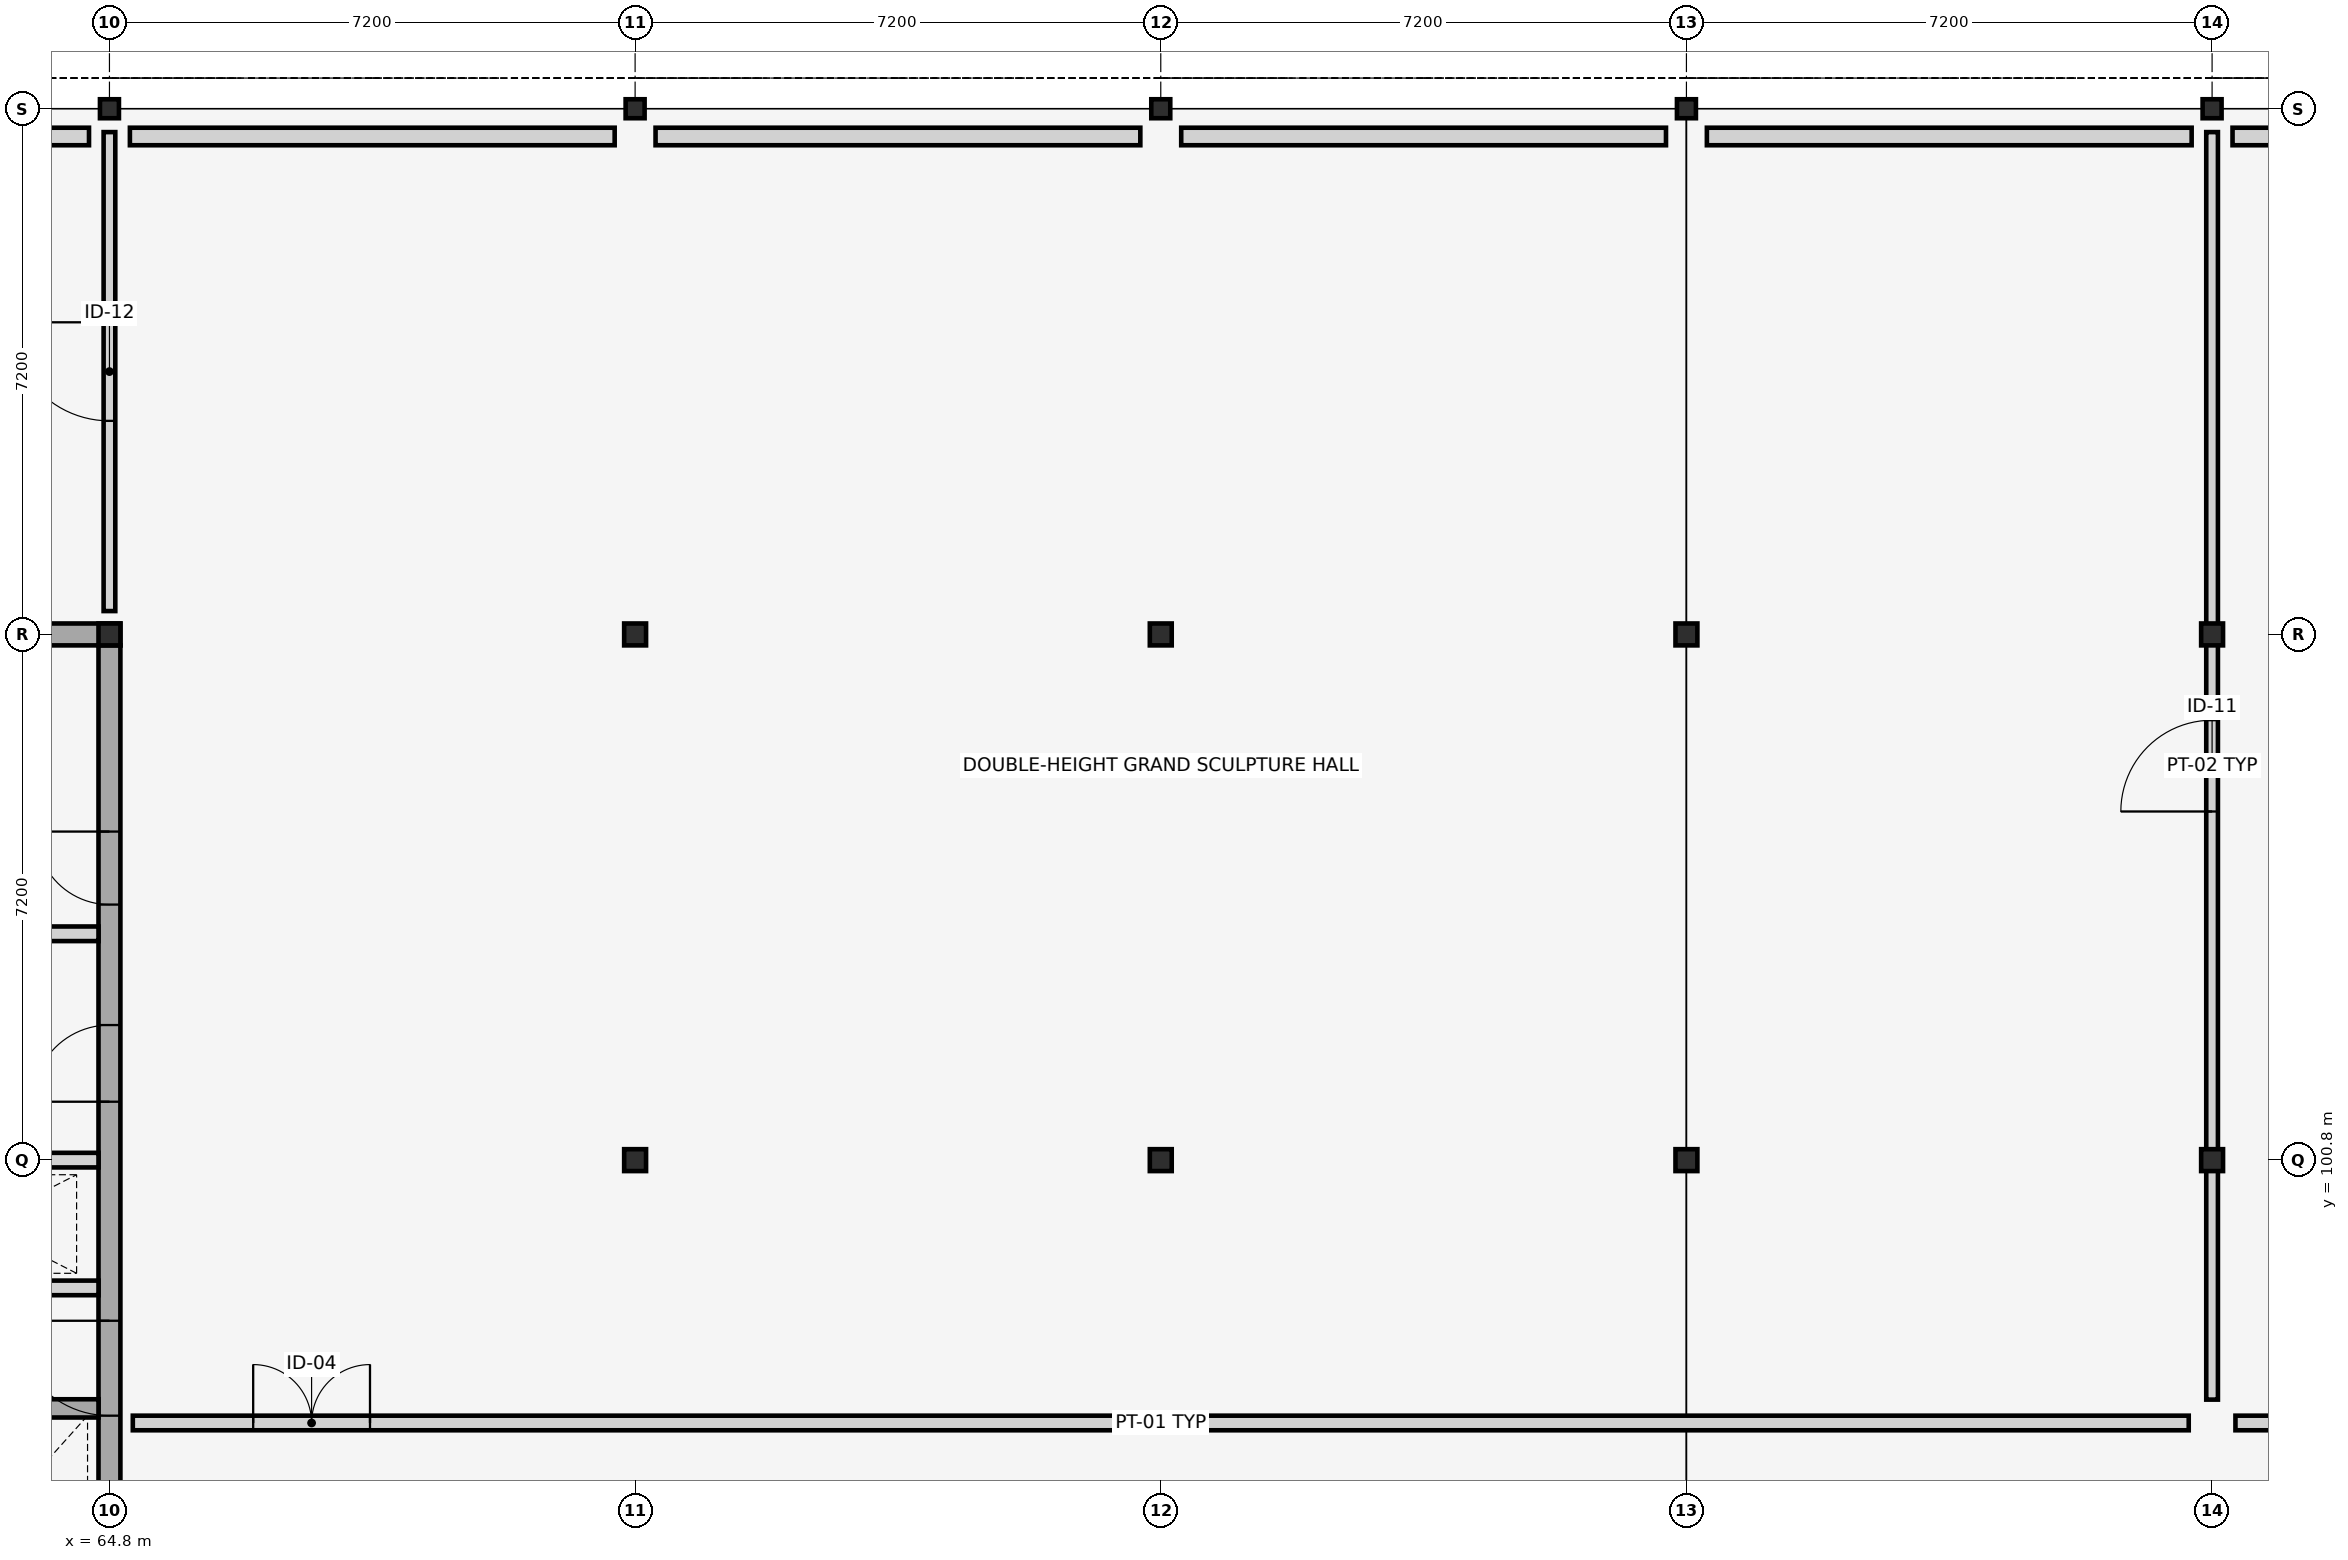
"""IFC4 building model, lengths in metres.
Left out: names, types, materials, properties, quantities, classifications, styles, units other than length and angle.
Written with IfcOpenShell. Run it as: python <this file> out.ifc"""

import sys

from ifc_helpers import new_model, si_unit, direction, frame, frame_2d, origin, origin_2d, place, context, subcontext, project, spatial, rectangle, i_section, extrude, element, fill, save


model = new_model("IFC4")
c1 = context("Model", 3, precision=1e-05, world=origin(), true_north=direction((0.0, 1.0)))
c2 = subcontext(c1, "Body", "Model", "MODEL_VIEW")
j1 = project(units=[si_unit("LENGTHUNIT", "METRE"), si_unit("PLANEANGLEUNIT", "RADIAN")], contexts=[c1])
p1 = place(None, origin())
s1 = spatial("IfcSite", under=j1, at=p1, CompositionType="ELEMENT")
p2 = place(p1, origin())
s2 = spatial("IfcBuilding", under=s1, at=p2, CompositionType="ELEMENT")
p3 = place(p2, frame((0.0, 0.0, 17.1)))
s3 = spatial("IfcBuildingStorey", under=s2, at=p3, CompositionType="ELEMENT", Elevation=17.1)
p4 = place(p3, frame((64.8, 108.0, 0.0), z_axis=(0.0, 0.0, 1.0), x_axis=(1.0, 0.0, 0.0)))
e1 = element("IfcColumn", 1, at=p4, inside=s3, PredefinedType="COLUMN", context=c2, shape_type="SweptSolid", body=[
    extrude(i_section(OverallWidth=0.3, OverallDepth=0.3, WebThickness=0.011, FlangeThickness=0.019, FilletRadius=0.027, at=origin_2d()), origin(), (0.0, 0.0, 1.0), 8.1),
])
p5 = place(p3, frame((64.8, 115.2, 0.0), z_axis=(0.0, 0.0, 1.0), x_axis=(0.0, 1.0, 0.0)))
e2 = element("IfcColumn", 2, at=p5, inside=s3, PredefinedType="COLUMN", context=c2, shape_type="SweptSolid", body=[
    extrude(i_section(OverallWidth=0.26, OverallDepth=0.26, WebThickness=0.01, FlangeThickness=0.018, FilletRadius=0.024, at=origin_2d()), origin(), (0.0, 0.0, 1.0), 8.1),
])
for number, where, z_axis, x_axis in (
    (3, (72.0, 100.8, 0.0), (0.0, 0.0, 1.0), (1.0, 0.0, 0.0)),
    (4, (72.0, 108.0, 0.0), (0.0, 0.0, 1.0), (0.0, 1.0, 0.0)),
):
    element("IfcColumn", number, at=place(p3, frame(where, z_axis=z_axis, x_axis=x_axis)), inside=s3, PredefinedType="COLUMN", context=c2, shape_type="SweptSolid", body=[
        extrude(i_section(OverallWidth=0.3, OverallDepth=0.3, WebThickness=0.011, FlangeThickness=0.019, FilletRadius=0.027, at=origin_2d()), origin(), (0.0, 0.0, 1.0), 8.1),
    ])
p6 = place(p3, frame((72.0, 115.2, 0.0), z_axis=(0.0, 0.0, 1.0), x_axis=(1.0, 0.0, 0.0)))
e5 = element("IfcColumn", 5, at=p6, inside=s3, PredefinedType="COLUMN", context=c2, shape_type="SweptSolid", body=[
    extrude(i_section(OverallWidth=0.26, OverallDepth=0.26, WebThickness=0.01, FlangeThickness=0.018, FilletRadius=0.024, at=origin_2d()), origin(), (0.0, 0.0, 1.0), 8.1),
])
for number, where, z_axis, x_axis in (
    (6, (79.2, 100.8, 0.0), (0.0, 0.0, 1.0), (0.0, 1.0, 0.0)),
    (7, (79.2, 108.0, 0.0), (0.0, 0.0, 1.0), (1.0, 0.0, 0.0)),
):
    element("IfcColumn", number, at=place(p3, frame(where, z_axis=z_axis, x_axis=x_axis)), inside=s3, PredefinedType="COLUMN", context=c2, shape_type="SweptSolid", body=[
        extrude(i_section(OverallWidth=0.3, OverallDepth=0.3, WebThickness=0.011, FlangeThickness=0.019, FilletRadius=0.027, at=origin_2d()), origin(), (0.0, 0.0, 1.0), 8.1),
    ])
p7 = place(p3, frame((79.2, 115.2, 0.0), z_axis=(0.0, 0.0, 1.0), x_axis=(0.0, 1.0, 0.0)))
e8 = element("IfcColumn", 8, at=p7, inside=s3, PredefinedType="COLUMN", context=c2, shape_type="SweptSolid", body=[
    extrude(i_section(OverallWidth=0.26, OverallDepth=0.26, WebThickness=0.01, FlangeThickness=0.018, FilletRadius=0.024, at=origin_2d()), origin(), (0.0, 0.0, 1.0), 8.1),
])
for number, where, z_axis, x_axis in (
    (9, (86.4, 100.8, 0.0), (0.0, 0.0, 1.0), (1.0, 0.0, 0.0)),
    (10, (86.4, 108.0, 0.0), (0.0, 0.0, 1.0), (0.0, 1.0, 0.0)),
):
    element("IfcColumn", number, at=place(p3, frame(where, z_axis=z_axis, x_axis=x_axis)), inside=s3, PredefinedType="COLUMN", context=c2, shape_type="SweptSolid", body=[
        extrude(i_section(OverallWidth=0.3, OverallDepth=0.3, WebThickness=0.011, FlangeThickness=0.019, FilletRadius=0.027, at=origin_2d()), origin(), (0.0, 0.0, 1.0), 8.1),
    ])
p8 = place(p3, frame((86.4, 115.2, 0.0), z_axis=(0.0, 0.0, 1.0), x_axis=(1.0, 0.0, 0.0)))
e11 = element("IfcColumn", 11, at=p8, inside=s3, PredefinedType="COLUMN", context=c2, shape_type="SweptSolid", body=[
    extrude(i_section(OverallWidth=0.26, OverallDepth=0.26, WebThickness=0.01, FlangeThickness=0.018, FilletRadius=0.024, at=origin_2d()), origin(), (0.0, 0.0, 1.0), 8.1),
])
for number, where, z_axis, x_axis in (
    (12, (93.6, 100.8, 0.0), (0.0, 0.0, 1.0), (0.0, 1.0, 0.0)),
    (13, (93.6, 108.0, 0.0), (0.0, 0.0, 1.0), (1.0, 0.0, 0.0)),
):
    element("IfcColumn", number, at=place(p3, frame(where, z_axis=z_axis, x_axis=x_axis)), inside=s3, PredefinedType="COLUMN", context=c2, shape_type="SweptSolid", body=[
        extrude(i_section(OverallWidth=0.3, OverallDepth=0.3, WebThickness=0.011, FlangeThickness=0.019, FilletRadius=0.027, at=origin_2d()), origin(), (0.0, 0.0, 1.0), 8.1),
    ])
p9 = place(p3, frame((93.6, 115.2, 0.0), z_axis=(0.0, 0.0, 1.0), x_axis=(0.0, 1.0, 0.0)))
e14 = element("IfcColumn", 14, at=p9, inside=s3, PredefinedType="COLUMN", context=c2, shape_type="SweptSolid", body=[
    extrude(i_section(OverallWidth=0.26, OverallDepth=0.26, WebThickness=0.01, FlangeThickness=0.018, FilletRadius=0.024, at=origin_2d()), origin(), (0.0, 0.0, 1.0), 8.1),
])
for number, where, z_axis, x_axis in (
    (15, (100.52, 114.82, 0.0), (0.0, 0.0, 1.0), (-1.0, 0.0, 0.0)),
    (16, (93.32, 114.82, 0.0), (0.0, 0.0, 1.0), (-1.0, 0.0, 0.0)),
    (17, (86.12, 114.82, 0.0), (0.0, 0.0, 1.0), (-1.0, 0.0, 0.0)),
):
    element("IfcWall", number, at=place(p3, frame(where, z_axis=z_axis, x_axis=x_axis)), inside=s3, PredefinedType="STANDARD", context=c2, shape_type="SweptSolid", body=[
        extrude(rectangle(XDim=6.64, YDim=0.24, at=frame_2d((3.32, 0.0))), origin(), (0.0, 0.0, 1.0), 7.48),
    ])
for number, where, z_axis, x_axis in (
    (18, (78.92, 114.82, 0.0), (0.0, 0.0, 1.0), (-1.0, 0.0, 0.0)),
    (19, (71.72, 114.82, 0.0), (0.0, 0.0, 1.0), (-1.0, 0.0, 0.0)),
):
    element("IfcWall", number, at=place(p3, frame(where, z_axis=z_axis, x_axis=x_axis)), inside=s3, PredefinedType="STANDARD", context=c2, shape_type="SweptSolid", body=[
        extrude(rectangle(XDim=6.64, YDim=0.24, at=frame_2d((3.32, 0.0))), origin(), (0.0, 0.0, 1.0), 7.48),
    ])
p10 = place(p3, frame((64.52, 114.82, 0.0), z_axis=(0.0, 0.0, 1.0), x_axis=(-1.0, 0.0, 0.0)))
e20 = element("IfcWall", 20, at=p10, inside=s3, PredefinedType="STANDARD", context=c2, shape_type="SweptSolid", body=[
    extrude(rectangle(XDim=6.64, YDim=0.24, at=frame_2d((3.32, 0.0))), origin(), (0.0, 0.0, 1.0), 7.48),
])
p11 = place(p3, frame((57.6, 108.0, 0.0), z_axis=(0.0, 0.0, 1.0), x_axis=(1.0, 0.0, 0.0)))
e21 = element("IfcWall", 21, at=p11, inside=s3, PredefinedType="SHEAR", context=c2, shape_type="SweptSolid", body=[
    extrude(rectangle(XDim=7.35, YDim=0.3, at=frame_2d((3.675, 0.0))), origin(), (0.0, 0.0, 1.0), 7.88),
])
p12 = place(p3, frame((64.8, 93.75, 0.0), z_axis=(0.0, 0.0, 1.0), x_axis=(0.0, 1.0, 0.0)))
e22 = element("IfcWall", 22, at=p12, inside=s3, PredefinedType="SHEAR", context=c2, shape_type="SweptSolid", body=[
    extrude(rectangle(XDim=14.1, YDim=0.3, at=frame_2d((7.05, 0.0))), origin(), (0.0, 0.0, 1.0), 7.88),
])
p13 = place(p12, frame((3.55, 0.0, 0.0)))
e23 = element("IfcOpeningElement", 23, at=p13, cuts=e22, PredefinedType="OPENING", context=c2, shape_type="SweptSolid", body=[
    extrude(rectangle(XDim=1.3, YDim=2.2, at=frame_2d((0.65, 1.1))), frame((0.0, 0.16, 0.0), z_axis=(0.0, -1.0, 0.0), x_axis=(1.0, 0.0, 0.0)), (0.0, 0.0, 1.0), 0.32),
])
p14 = place(p12, frame((7.85, 0.0, 0.0)))
e24 = element("IfcOpeningElement", 24, at=p14, cuts=e22, PredefinedType="OPENING", context=c2, shape_type="SweptSolid", body=[
    extrude(rectangle(XDim=1.05, YDim=2.15, at=frame_2d((0.525, 1.075))), frame((0.0, 0.16, 0.0), z_axis=(0.0, -1.0, 0.0), x_axis=(1.0, 0.0, 0.0)), (0.0, 0.0, 1.0), 0.32),
])
p15 = place(p12, frame((10.55, 0.0, 0.0)))
e25 = element("IfcOpeningElement", 25, at=p15, cuts=e22, PredefinedType="OPENING", context=c2, shape_type="SweptSolid", body=[
    extrude(rectangle(XDim=1.0, YDim=2.15, at=frame_2d((0.5, 1.075))), frame((0.0, 0.16, 0.0), z_axis=(0.0, -1.0, 0.0), x_axis=(1.0, 0.0, 0.0)), (0.0, 0.0, 1.0), 0.32),
])
p16 = place(p3, frame((61.1, 99.05, 0.0), z_axis=(0.0, 0.0, 1.0), x_axis=(1.0, 0.0, 0.0)))
e26 = element("IfcWall", 26, at=p16, inside=s3, PredefinedType="PLUMBINGWALL", context=c2, shape_type="SweptSolid", body=[
    extrude(rectangle(XDim=3.55, YDim=0.2, at=frame_2d((1.775, 0.0))), origin(), (0.0, 0.0, 1.0), 7.3),
])
p17 = place(p16, frame((0.9, 0.0, 0.0)))
e27 = element("IfcOpeningElement", 27, at=p17, cuts=e26, PredefinedType="OPENING", context=c2, shape_type="SweptSolid", body=[
    extrude(rectangle(XDim=0.85, YDim=2.05, at=frame_2d((0.425, 1.025))), frame((0.0, 0.11, 0.0), z_axis=(0.0, -1.0, 0.0), x_axis=(1.0, 0.0, 0.0)), (0.0, 0.0, 1.0), 0.22),
])
p18 = place(p3, frame((61.275, 97.4, 0.0), z_axis=(0.0, 0.0, 1.0), x_axis=(1.0, 0.0, 0.0)))
e28 = element("IfcWall", 28, at=p18, inside=s3, PredefinedType="SHEAR", context=c2, shape_type="SweptSolid", body=[
    extrude(rectangle(XDim=3.375, YDim=0.25, at=frame_2d((1.688, 0.0))), origin(), (0.0, 0.0, 1.0), 7.88),
])
for number, where, z_axis, x_axis in (
    (29, (61.1, 100.8, 0.0), (0.0, 0.0, 1.0), (1.0, 0.0, 0.0)),
    (30, (61.1, 103.9, 0.0), (0.0, 0.0, 1.0), (1.0, 0.0, 0.0)),
):
    element("IfcWall", number, at=place(p3, frame(where, z_axis=z_axis, x_axis=x_axis)), inside=s3, PredefinedType="PLUMBINGWALL", context=c2, shape_type="SweptSolid", body=[
        extrude(rectangle(XDim=3.55, YDim=0.2, at=frame_2d((1.775, 0.0))), origin(), (0.0, 0.0, 1.0), 7.3),
    ])
p19 = place(p3, frame((65.12, 97.2, 0.0), z_axis=(0.0, 0.0, 1.0), x_axis=(1.0, 0.0, 0.0)))
e31 = element("IfcWall", 31, at=p19, inside=s3, PredefinedType="PARTITIONING", context=c2, shape_type="SweptSolid", body=[
    extrude(rectangle(XDim=28.16, YDim=0.2, at=frame_2d((14.08, 0.0))), origin(), (0.0, 0.0, 1.0), 7.05),
])
p20 = place(p19, frame((1.649, 0.0, 0.0)))
e32 = element("IfcOpeningElement", 32, at=p20, cuts=e31, PredefinedType="OPENING", context=c2, shape_type="SweptSolid", body=[
    extrude(rectangle(XDim=1.6, YDim=2.35, at=frame_2d((0.8, 1.175))), frame((0.0, 0.11, 0.0), z_axis=(0.0, -1.0, 0.0), x_axis=(1.0, 0.0, 0.0)), (0.0, 0.0, 1.0), 0.22),
])
p21 = place(p3, frame((93.92, 97.2, 0.0), z_axis=(0.0, 0.0, 1.0), x_axis=(1.0, 0.0, 0.0)))
e33 = element("IfcWall", 33, at=p21, inside=s3, PredefinedType="PARTITIONING", context=c2, shape_type="SweptSolid", body=[
    extrude(rectangle(XDim=6.56, YDim=0.2, at=frame_2d((3.28, 0.0))), origin(), (0.0, 0.0, 1.0), 7.05),
])
p22 = place(p21, frame((2.48, 0.0, 0.0)))
e34 = element("IfcOpeningElement", 34, at=p22, cuts=e33, PredefinedType="OPENING", context=c2, shape_type="SweptSolid", body=[
    extrude(rectangle(XDim=1.6, YDim=2.35, at=frame_2d((0.8, 1.175))), frame((0.0, 0.11, 0.0), z_axis=(0.0, -1.0, 0.0), x_axis=(1.0, 0.0, 0.0)), (0.0, 0.0, 1.0), 0.22),
])
p23 = place(p3, frame((93.6, 97.52, 0.0), z_axis=(0.0, 0.0, 1.0), x_axis=(0.0, 1.0, 0.0)))
e35 = element("IfcWall", 35, at=p23, inside=s3, PredefinedType="PARTITIONING", context=c2, shape_type="SweptSolid", body=[
    extrude(rectangle(XDim=17.36, YDim=0.16, at=frame_2d((8.68, 0.0))), origin(), (0.0, 0.0, 1.0), 7.05),
])
p24 = place(p23, frame((8.055, 0.0, 0.0)))
e36 = element("IfcOpeningElement", 36, at=p24, cuts=e35, PredefinedType="OPENING", context=c2, shape_type="SweptSolid", body=[
    extrude(rectangle(XDim=1.25, YDim=2.3, at=frame_2d((0.625, 1.15))), frame((0.0, 0.09, 0.0), z_axis=(0.0, -1.0, 0.0), x_axis=(1.0, 0.0, 0.0)), (0.0, 0.0, 1.0), 0.18),
])
p25 = place(p3, frame((64.8, 108.32, 0.0), z_axis=(0.0, 0.0, 1.0), x_axis=(0.0, 1.0, 0.0)))
e37 = element("IfcWall", 37, at=p25, inside=s3, PredefinedType="PARTITIONING", context=c2, shape_type="SweptSolid", body=[
    extrude(rectangle(XDim=6.56, YDim=0.16, at=frame_2d((3.28, 0.0))), origin(), (0.0, 0.0, 1.0), 7.05),
])
p26 = place(p25, frame((2.605, 0.0, 0.0)))
e38 = element("IfcOpeningElement", 38, at=p26, cuts=e37, PredefinedType="OPENING", context=c2, shape_type="SweptSolid", body=[
    extrude(rectangle(XDim=1.35, YDim=2.35, at=frame_2d((0.675, 1.175))), frame((0.0, 0.09, 0.0), z_axis=(0.0, -1.0, 0.0), x_axis=(1.0, 0.0, 0.0)), (0.0, 0.0, 1.0), 0.18),
])
p27 = place(p13, origin())
e39 = element("IfcDoor", 39, at=p27, inside=s3, OperationType="SINGLE_SWING_RIGHT", PredefinedType="DOOR", context=c2, shape_type="SweptSolid", body=[
    extrude(rectangle(XDim=1.3, YDim=2.2, at=frame_2d((0.65, 1.1))), frame((0.0, 0.025, 0.0), z_axis=(0.0, -1.0, 0.0), x_axis=(1.0, 0.0, 0.0)), (0.0, 0.0, 1.0), 0.05),
])
fill(e23, e39)
p28 = place(p14, origin())
e40 = element("IfcDoor", 40, at=p28, inside=s3, OperationType="SINGLE_SWING_LEFT", PredefinedType="DOOR", context=c2, shape_type="SweptSolid", body=[
    extrude(rectangle(XDim=1.05, YDim=2.15, at=frame_2d((0.525, 1.075))), frame((0.0, 0.025, 0.0), z_axis=(0.0, -1.0, 0.0), x_axis=(1.0, 0.0, 0.0)), (0.0, 0.0, 1.0), 0.05),
])
fill(e24, e40)
p29 = place(p15, origin())
e41 = element("IfcDoor", 41, at=p29, inside=s3, OperationType="SINGLE_SWING_RIGHT", PredefinedType="DOOR", context=c2, shape_type="SweptSolid", body=[
    extrude(rectangle(XDim=1.0, YDim=2.15, at=frame_2d((0.5, 1.075))), frame((0.0, 0.025, 0.0), z_axis=(0.0, -1.0, 0.0), x_axis=(1.0, 0.0, 0.0)), (0.0, 0.0, 1.0), 0.05),
])
fill(e25, e41)
p30 = place(p20, origin())
e42 = element("IfcDoor", 42, at=p30, inside=s3, OperationType="DOUBLE_DOOR_SINGLE_SWING", PredefinedType="DOOR", context=c2, shape_type="SweptSolid", body=[
    extrude(rectangle(XDim=1.6, YDim=2.35, at=frame_2d((0.8, 1.175))), frame((0.0, 0.025, 0.0), z_axis=(0.0, -1.0, 0.0), x_axis=(1.0, 0.0, 0.0)), (0.0, 0.0, 1.0), 0.05),
])
fill(e32, e42)
p31 = place(p24, origin())
e43 = element("IfcDoor", 43, at=p31, inside=s3, OperationType="SINGLE_SWING_LEFT", PredefinedType="DOOR", context=c2, shape_type="SweptSolid", body=[
    extrude(rectangle(XDim=1.25, YDim=2.3, at=frame_2d((0.625, 1.15))), frame((0.0, 0.025, 0.0), z_axis=(0.0, -1.0, 0.0), x_axis=(1.0, 0.0, 0.0)), (0.0, 0.0, 1.0), 0.05),
])
fill(e36, e43)
p32 = place(p26, origin())
e44 = element("IfcDoor", 44, at=p32, inside=s3, OperationType="SINGLE_SWING_RIGHT", PredefinedType="DOOR", context=c2, shape_type="SweptSolid", body=[
    extrude(rectangle(XDim=1.35, YDim=2.35, at=frame_2d((0.675, 1.175))), frame((0.0, 0.025, 0.0), z_axis=(0.0, -1.0, 0.0), x_axis=(1.0, 0.0, 0.0)), (0.0, 0.0, 1.0), 0.05),
])
fill(e38, e44)
save(model, sys.argv[1])
